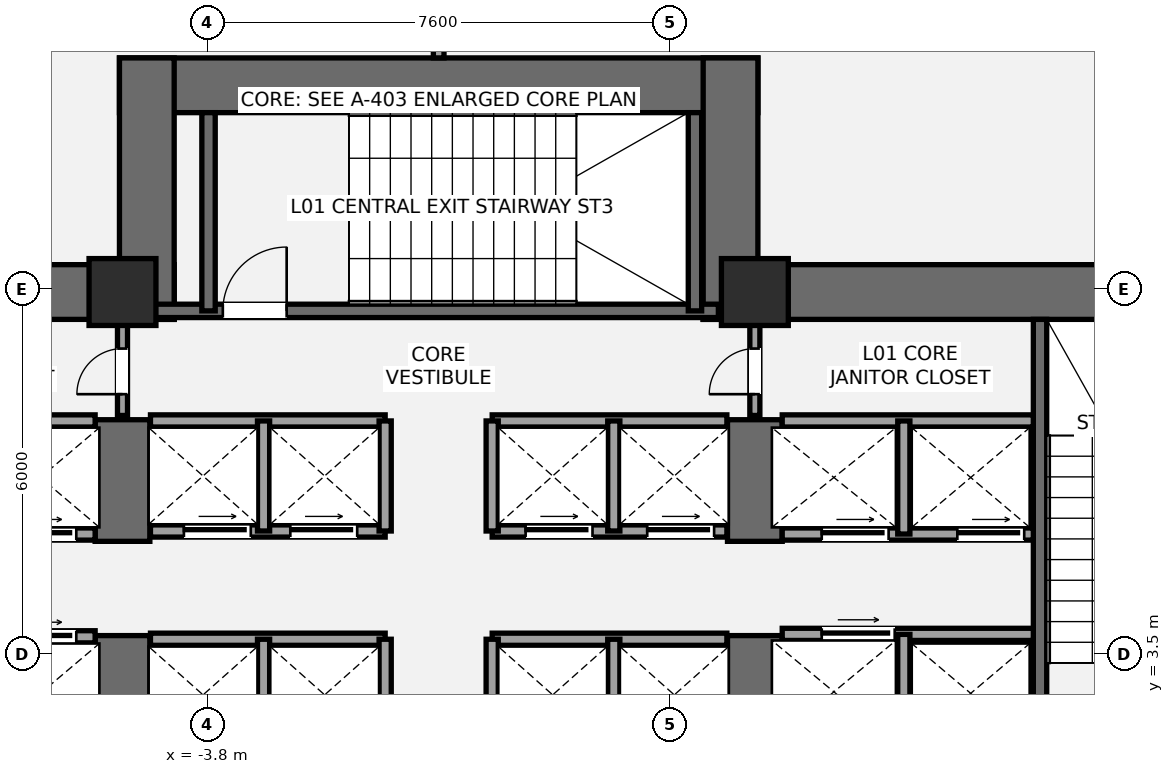
"""IFC4 building model, lengths in metres.
Left out: names, types, materials, properties, quantities, classifications, styles, units other than length and angle.
Written with IfcOpenShell. Run it as: python <this file> out.ifc"""

import sys

from ifc_helpers import new_model, si_unit, direction, frame, frame_2d, origin, origin_2d, place, context, subcontext, project, spatial, rectangle, extrude, element, fill, save


model = new_model("IFC4")
c1 = context("Model", 3, precision=1e-05, world=origin(), true_north=direction((0.0, 1.0)))
c2 = subcontext(c1, "Body", "Model", "MODEL_VIEW")
j1 = project(units=[si_unit("LENGTHUNIT", "METRE"), si_unit("PLANEANGLEUNIT", "RADIAN")], contexts=[c1])
p1 = place(None, origin())
s1 = spatial("IfcSite", under=j1, at=p1, CompositionType="ELEMENT")
p2 = place(p1, origin())
s2 = spatial("IfcBuilding", under=s1, at=p2, CompositionType="ELEMENT")
p3 = place(p2, frame((0.0, 0.0, 6.0)))
s3 = spatial("IfcBuildingStorey", under=s2, at=p3, CompositionType="ELEMENT", Elevation=6.0)
p4 = place(p3, frame((-14.05, 9.45, 0.0), z_axis=(0.0, 0.0, 1.0), x_axis=(1.0, 0.0, 0.0)))
e1 = element("IfcWall", 1, at=p4, inside=s3, PredefinedType="SHEAR", context=c2, shape_type="SweptSolid", body=[
    extrude(rectangle(XDim=9.7, YDim=0.9, at=frame_2d((4.85, 0.0))), origin(), (0.0, 0.0, 1.0), 4.2),
])
p5 = place(p3, frame((-5.2, 0.95, 0.0), z_axis=(0.0, 0.0, 1.0), x_axis=(0.0, 1.0, 0.0)))
e2 = element("IfcWall", 2, at=p5, inside=s3, PredefinedType="SHEAR", context=c2, shape_type="SweptSolid", body=[
    extrude(rectangle(XDim=2.85, YDim=0.9, at=frame_2d((1.425, 0.0))), origin(), (0.0, 0.0, 1.0), 4.2),
])
p6 = place(p3, frame((-5.2, 5.35, 0.0), z_axis=(0.0, 0.0, 1.0), x_axis=(0.0, 1.0, 0.0)))
e3 = element("IfcWall", 3, at=p6, inside=s3, PredefinedType="SHEAR", context=c2, shape_type="SweptSolid", body=[
    extrude(rectangle(XDim=2.0, YDim=0.9, at=frame_2d((1.0, 0.0))), origin(), (0.0, 0.0, 1.0), 4.2),
])
p7 = place(p3, frame((4.35, 9.45, 0.0), z_axis=(0.0, 0.0, 1.0), x_axis=(1.0, 0.0, 0.0)))
e4 = element("IfcWall", 4, at=p7, inside=s3, PredefinedType="SHEAR", context=c2, shape_type="SweptSolid", body=[
    extrude(rectangle(XDim=9.7, YDim=0.9, at=frame_2d((4.85, 0.0))), origin(), (0.0, 0.0, 1.0), 4.2),
])
p8 = place(p3, frame((5.2, 0.95, 0.0), z_axis=(0.0, 0.0, 1.0), x_axis=(0.0, 1.0, 0.0)))
e5 = element("IfcWall", 5, at=p8, inside=s3, PredefinedType="SHEAR", context=c2, shape_type="SweptSolid", body=[
    extrude(rectangle(XDim=2.85, YDim=0.9, at=frame_2d((1.425, 0.0))), origin(), (0.0, 0.0, 1.0), 4.2),
])
p9 = place(p3, frame((5.2, 5.35, 0.0), z_axis=(0.0, 0.0, 1.0), x_axis=(0.0, 1.0, 0.0)))
e6 = element("IfcWall", 6, at=p9, inside=s3, PredefinedType="SHEAR", context=c2, shape_type="SweptSolid", body=[
    extrude(rectangle(XDim=2.0, YDim=0.9, at=frame_2d((1.0, 0.0))), origin(), (0.0, 0.0, 1.0), 4.2),
])
p10 = place(p3, frame((9.89, 1.85, 0.0), z_axis=(0.0, 0.0, 1.0), x_axis=(0.0, 1.0, 0.0)))
e7 = element("IfcWall", 7, at=p10, inside=s3, PredefinedType="SHEAR", context=c2, shape_type="SweptSolid", body=[
    extrude(rectangle(XDim=7.15, YDim=0.22, at=frame_2d((3.575, 0.0))), origin(), (0.0, 0.0, 1.0), 4.2),
])
p11 = place(p3, frame((-5.25, 12.85, 0.0), z_axis=(0.0, 0.0, 1.0), x_axis=(1.0, 0.0, 0.0)))
e8 = element("IfcWall", 8, at=p11, inside=s3, PredefinedType="SHEAR", context=c2, shape_type="SweptSolid", body=[
    extrude(rectangle(XDim=10.5, YDim=0.9, at=frame_2d((5.25, 0.0))), origin(), (0.0, 0.0, 1.0), 4.2),
])
for number, where, z_axis, x_axis in (
    (9, (-4.8, 9.0, 0.0), (0.0, 0.0, 1.0), (0.0, 1.0, 0.0)),
    (10, (4.8, 9.0, 0.0), (0.0, 0.0, 1.0), (0.0, 1.0, 0.0)),
):
    element("IfcWall", number, at=place(p3, frame(where, z_axis=z_axis, x_axis=x_axis)), inside=s3, PredefinedType="SHEAR", context=c2, shape_type="SweptSolid", body=[
        extrude(rectangle(XDim=4.3, YDim=0.9, at=frame_2d((2.15, 0.0))), origin(), (0.0, 0.0, 1.0), 4.2),
    ])
p12 = place(p3, frame((-4.7, 9.14, 0.0), z_axis=(0.0, 0.0, 1.0), x_axis=(1.0, 0.0, 0.0)))
e11 = element("IfcWall", 11, at=p12, inside=s3, PredefinedType="SHEAR", context=c2, shape_type="SweptSolid", body=[
    extrude(rectangle(XDim=9.3, YDim=0.22, at=frame_2d((4.65, 0.0))), origin(), (0.0, 0.0, 1.0), 4.2),
])
p13 = place(p12, frame((1.15, 0.0, 0.0)))
e12 = element("IfcOpeningElement", 12, at=p13, cuts=e11, PredefinedType="OPENING", context=c2, shape_type="SweptSolid", body=[
    extrude(rectangle(XDim=1.05, YDim=2.15, at=frame_2d((0.525, 1.075))), frame((0.0, 0.12, 0.0), z_axis=(0.0, -1.0, 0.0), x_axis=(1.0, 0.0, 0.0)), (0.0, 0.0, 1.0), 0.24),
])
for number, where, z_axis, x_axis in (
    (13, (-3.785, 9.14, 0.0), (0.0, 0.0, 1.0), (0.0, 1.0, 0.0)),
    (14, (4.215, 9.14, 0.0), (0.0, 0.0, 1.0), (0.0, 1.0, 0.0)),
):
    element("IfcWall", number, at=place(p3, frame(where, z_axis=z_axis, x_axis=x_axis)), inside=s3, PredefinedType="SHEAR", context=c2, shape_type="SweptSolid", body=[
        extrude(rectangle(XDim=3.26, YDim=0.22, at=frame_2d((1.63, 0.0))), origin(), (0.0, 0.0, 1.0), 4.2),
    ])
for number, where, z_axis, x_axis in (
    (15, (-5.2, 9.45, 0.0), (0.0, 0.0, 1.0), (1.0, 0.0, 0.0)),
    (16, (5.2, 9.45, 0.0), (0.0, 0.0, 1.0), (1.0, 0.0, 0.0)),
):
    element("IfcColumn", number, at=place(p3, frame(where, z_axis=z_axis, x_axis=x_axis)), inside=s3, PredefinedType="COLUMN", context=c2, shape_type="SweptSolid", body=[
        extrude(rectangle(XDim=1.1, YDim=1.1, at=origin_2d()), origin(), (0.0, 0.0, 1.0), 4.2),
    ])
p14 = place(p3, frame((-9.78, 3.78, 0.0), z_axis=(0.0, 0.0, 1.0), x_axis=(1.0, 0.0, 0.0)))
e17 = element("IfcWall", 17, at=p14, inside=s3, PredefinedType="SOLIDWALL", context=c2, shape_type="SweptSolid", body=[
    extrude(rectangle(XDim=4.13, YDim=0.2, at=frame_2d((2.065, 0.0))), origin(), (0.0, 0.0, 1.0), 3.98),
])
p15 = place(p14, frame((2.72, 0.0, 0.0)))
e18 = element("IfcOpeningElement", 18, at=p15, cuts=e17, PredefinedType="OPENING", context=c2, shape_type="SweptSolid", body=[
    extrude(rectangle(XDim=1.1, YDim=2.2, at=frame_2d((0.55, 1.1))), frame((0.0, 0.11, 0.0), z_axis=(0.0, -1.0, 0.0), x_axis=(1.0, 0.0, 0.0)), (0.0, 0.0, 1.0), 0.22),
])
p16 = place(p3, frame((-9.78, 5.47, 0.0), z_axis=(0.0, 0.0, 1.0), x_axis=(1.0, 0.0, 0.0)))
e19 = element("IfcWall", 19, at=p16, inside=s3, PredefinedType="SOLIDWALL", context=c2, shape_type="SweptSolid", body=[
    extrude(rectangle(XDim=4.13, YDim=0.2, at=frame_2d((2.065, 0.0))), origin(), (0.0, 0.0, 1.0), 3.98),
])
p17 = place(p16, frame((0.55, 0.0, 0.0)))
e20 = element("IfcOpeningElement", 20, at=p17, cuts=e19, PredefinedType="OPENING", context=c2, shape_type="SweptSolid", body=[
    extrude(rectangle(XDim=1.1, YDim=2.2, at=frame_2d((0.55, 1.1))), frame((0.0, 0.11, 0.0), z_axis=(0.0, -1.0, 0.0), x_axis=(1.0, 0.0, 0.0)), (0.0, 0.0, 1.0), 0.22),
])
p18 = place(p16, frame((2.72, 0.0, 0.0)))
e21 = element("IfcOpeningElement", 21, at=p18, cuts=e19, PredefinedType="OPENING", context=c2, shape_type="SweptSolid", body=[
    extrude(rectangle(XDim=1.1, YDim=2.2, at=frame_2d((0.55, 1.1))), frame((0.0, 0.11, 0.0), z_axis=(0.0, -1.0, 0.0), x_axis=(1.0, 0.0, 0.0)), (0.0, 0.0, 1.0), 0.22),
])
p19 = place(p3, frame((-9.78, 7.33, 0.0), z_axis=(0.0, 0.0, 1.0), x_axis=(1.0, 0.0, 0.0)))
e22 = element("IfcWall", 22, at=p19, inside=s3, PredefinedType="SOLIDWALL", context=c2, shape_type="SweptSolid", body=[
    extrude(rectangle(XDim=4.13, YDim=0.2, at=frame_2d((2.065, 0.0))), origin(), (0.0, 0.0, 1.0), 3.98),
])
p20 = place(p3, frame((5.65, 3.82, 0.0), z_axis=(0.0, 0.0, 1.0), x_axis=(1.0, 0.0, 0.0)))
e23 = element("IfcWall", 23, at=p20, inside=s3, PredefinedType="SOLIDWALL", context=c2, shape_type="SweptSolid", body=[
    extrude(rectangle(XDim=4.13, YDim=0.2, at=frame_2d((2.065, 0.0))), origin(), (0.0, 0.0, 1.0), 3.98),
])
p21 = place(p20, frame((0.65, 0.0, 0.0)))
e24 = element("IfcOpeningElement", 24, at=p21, cuts=e23, PredefinedType="OPENING", context=c2, shape_type="SweptSolid", body=[
    extrude(rectangle(XDim=1.2, YDim=2.2, at=frame_2d((0.6, 1.1))), frame((0.0, 0.11, 0.0), z_axis=(0.0, -1.0, 0.0), x_axis=(1.0, 0.0, 0.0)), (0.0, 0.0, 1.0), 0.22),
])
p22 = place(p3, frame((7.65, 1.85, 0.0), z_axis=(0.0, 0.0, 1.0), x_axis=(0.0, 1.0, 0.0)))
e25 = element("IfcWall", 25, at=p22, inside=s3, PredefinedType="SOLIDWALL", context=c2, shape_type="SweptSolid", body=[
    extrude(rectangle(XDim=1.97, YDim=0.2, at=frame_2d((0.985, 0.0))), origin(), (0.0, 0.0, 1.0), 3.98),
])
p23 = place(p3, frame((5.65, 5.47, 0.0), z_axis=(0.0, 0.0, 1.0), x_axis=(1.0, 0.0, 0.0)))
e26 = element("IfcWall", 26, at=p23, inside=s3, PredefinedType="SOLIDWALL", context=c2, shape_type="SweptSolid", body=[
    extrude(rectangle(XDim=4.13, YDim=0.2, at=frame_2d((2.065, 0.0))), origin(), (0.0, 0.0, 1.0), 3.98),
])
p24 = place(p23, frame((0.65, 0.0, 0.0)))
e27 = element("IfcOpeningElement", 27, at=p24, cuts=e26, PredefinedType="OPENING", context=c2, shape_type="SweptSolid", body=[
    extrude(rectangle(XDim=1.1, YDim=2.2, at=frame_2d((0.55, 1.1))), frame((0.0, 0.11, 0.0), z_axis=(0.0, -1.0, 0.0), x_axis=(1.0, 0.0, 0.0)), (0.0, 0.0, 1.0), 0.22),
])
p25 = place(p23, frame((2.88, 0.0, 0.0)))
e28 = element("IfcOpeningElement", 28, at=p25, cuts=e26, PredefinedType="OPENING", context=c2, shape_type="SweptSolid", body=[
    extrude(rectangle(XDim=1.1, YDim=2.2, at=frame_2d((0.55, 1.1))), frame((0.0, 0.11, 0.0), z_axis=(0.0, -1.0, 0.0), x_axis=(1.0, 0.0, 0.0)), (0.0, 0.0, 1.0), 0.22),
])
p26 = place(p3, frame((5.65, 7.33, 0.0), z_axis=(0.0, 0.0, 1.0), x_axis=(1.0, 0.0, 0.0)))
e29 = element("IfcWall", 29, at=p26, inside=s3, PredefinedType="SOLIDWALL", context=c2, shape_type="SweptSolid", body=[
    extrude(rectangle(XDim=4.13, YDim=0.2, at=frame_2d((2.065, 0.0))), origin(), (0.0, 0.0, 1.0), 3.98),
])
p27 = place(p3, frame((7.65, 5.47, 0.0), z_axis=(0.0, 0.0, 1.0), x_axis=(0.0, 1.0, 0.0)))
e30 = element("IfcWall", 30, at=p27, inside=s3, PredefinedType="SOLIDWALL", context=c2, shape_type="SweptSolid", body=[
    extrude(rectangle(XDim=1.86, YDim=0.2, at=frame_2d((0.93, 0.0))), origin(), (0.0, 0.0, 1.0), 3.98),
])
for number, where, z_axis, x_axis in (
    (31, (-4.74, 3.74, 0.0), (0.0, 0.0, 1.0), (1.0, 0.0, 0.0)),
    (32, (0.88, 3.74, 0.0), (0.0, 0.0, 1.0), (1.0, 0.0, 0.0)),
):
    element("IfcWall", number, at=place(p3, frame(where, z_axis=z_axis, x_axis=x_axis)), inside=s3, PredefinedType="SOLIDWALL", context=c2, shape_type="SweptSolid", body=[
        extrude(rectangle(XDim=3.86, YDim=0.2, at=frame_2d((1.93, 0.0))), origin(), (0.0, 0.0, 1.0), 3.98),
    ])
for number, where, z_axis, x_axis in (
    (33, (-2.88, 1.92, 0.0), (0.0, 0.0, 1.0), (0.0, 1.0, 0.0)),
    (34, (2.88, 1.92, 0.0), (0.0, 0.0, 1.0), (0.0, 1.0, 0.0)),
    (35, (-0.88, 1.92, 0.0), (0.0, 0.0, 1.0), (0.0, 1.0, 0.0)),
    (36, (0.88, 1.92, 0.0), (0.0, 0.0, 1.0), (0.0, 1.0, 0.0)),
):
    element("IfcWall", number, at=place(p3, frame(where, z_axis=z_axis, x_axis=x_axis)), inside=s3, PredefinedType="SOLIDWALL", context=c2, shape_type="SweptSolid", body=[
        extrude(rectangle(XDim=1.82, YDim=0.2, at=frame_2d((0.91, 0.0))), origin(), (0.0, 0.0, 1.0), 3.98),
    ])
p28 = place(p3, frame((-4.74, 5.52, 0.0), z_axis=(0.0, 0.0, 1.0), x_axis=(1.0, 0.0, 0.0)))
e37 = element("IfcWall", 37, at=p28, inside=s3, PredefinedType="SOLIDWALL", context=c2, shape_type="SweptSolid", body=[
    extrude(rectangle(XDim=3.86, YDim=0.2, at=frame_2d((1.93, 0.0))), origin(), (0.0, 0.0, 1.0), 3.98),
])
p29 = place(p28, frame((0.55, 0.0, 0.0)))
e38 = element("IfcOpeningElement", 38, at=p29, cuts=e37, PredefinedType="OPENING", context=c2, shape_type="SweptSolid", body=[
    extrude(rectangle(XDim=1.1, YDim=2.2, at=frame_2d((0.55, 1.1))), frame((0.0, 0.11, 0.0), z_axis=(0.0, -1.0, 0.0), x_axis=(1.0, 0.0, 0.0)), (0.0, 0.0, 1.0), 0.22),
])
p30 = place(p28, frame((2.3, 0.0, 0.0)))
e39 = element("IfcOpeningElement", 39, at=p30, cuts=e37, PredefinedType="OPENING", context=c2, shape_type="SweptSolid", body=[
    extrude(rectangle(XDim=1.1, YDim=2.2, at=frame_2d((0.55, 1.1))), frame((0.0, 0.11, 0.0), z_axis=(0.0, -1.0, 0.0), x_axis=(1.0, 0.0, 0.0)), (0.0, 0.0, 1.0), 0.22),
])
p31 = place(p3, frame((0.88, 5.52, 0.0), z_axis=(0.0, 0.0, 1.0), x_axis=(1.0, 0.0, 0.0)))
e40 = element("IfcWall", 40, at=p31, inside=s3, PredefinedType="SOLIDWALL", context=c2, shape_type="SweptSolid", body=[
    extrude(rectangle(XDim=3.86, YDim=0.2, at=frame_2d((1.93, 0.0))), origin(), (0.0, 0.0, 1.0), 3.98),
])
p32 = place(p31, frame((0.55, 0.0, 0.0)))
e41 = element("IfcOpeningElement", 41, at=p32, cuts=e40, PredefinedType="OPENING", context=c2, shape_type="SweptSolid", body=[
    extrude(rectangle(XDim=1.1, YDim=2.2, at=frame_2d((0.55, 1.1))), frame((0.0, 0.11, 0.0), z_axis=(0.0, -1.0, 0.0), x_axis=(1.0, 0.0, 0.0)), (0.0, 0.0, 1.0), 0.22),
])
p33 = place(p31, frame((2.55, 0.0, 0.0)))
e42 = element("IfcOpeningElement", 42, at=p33, cuts=e40, PredefinedType="OPENING", context=c2, shape_type="SweptSolid", body=[
    extrude(rectangle(XDim=1.1, YDim=2.2, at=frame_2d((0.55, 1.1))), frame((0.0, 0.11, 0.0), z_axis=(0.0, -1.0, 0.0), x_axis=(1.0, 0.0, 0.0)), (0.0, 0.0, 1.0), 0.22),
])
for number, where, z_axis, x_axis in (
    (43, (-4.74, 7.33, 0.0), (0.0, 0.0, 1.0), (1.0, 0.0, 0.0)),
    (44, (0.88, 7.33, 0.0), (0.0, 0.0, 1.0), (1.0, 0.0, 0.0)),
):
    element("IfcWall", number, at=place(p3, frame(where, z_axis=z_axis, x_axis=x_axis)), inside=s3, PredefinedType="SOLIDWALL", context=c2, shape_type="SweptSolid", body=[
        extrude(rectangle(XDim=3.86, YDim=0.2, at=frame_2d((1.93, 0.0))), origin(), (0.0, 0.0, 1.0), 3.98),
    ])
for number, where, z_axis, x_axis in (
    (45, (-2.88, 5.52, 0.0), (0.0, 0.0, 1.0), (0.0, 1.0, 0.0)),
    (46, (2.88, 5.52, 0.0), (0.0, 0.0, 1.0), (0.0, 1.0, 0.0)),
    (47, (-0.88, 5.52, 0.0), (0.0, 0.0, 1.0), (0.0, 1.0, 0.0)),
    (48, (0.88, 5.52, 0.0), (0.0, 0.0, 1.0), (0.0, 1.0, 0.0)),
):
    element("IfcWall", number, at=place(p3, frame(where, z_axis=z_axis, x_axis=x_axis)), inside=s3, PredefinedType="SOLIDWALL", context=c2, shape_type="SweptSolid", body=[
        extrude(rectangle(XDim=1.81, YDim=0.2, at=frame_2d((0.905, 0.0))), origin(), (0.0, 0.0, 1.0), 3.98),
    ])
p34 = place(p3, frame((-5.2, 7.42, 0.0), z_axis=(0.0, 0.0, 1.0), x_axis=(0.0, 1.0, 0.0)))
e49 = element("IfcWall", 49, at=p34, inside=s3, PredefinedType="PARTITIONING", context=c2, shape_type="SweptSolid", body=[
    extrude(rectangle(XDim=1.58, YDim=0.165, at=frame_2d((0.79, 0.0))), origin(), (0.0, 0.0, 1.0), 3.98),
])
p35 = place(p34, frame((0.35, 0.0, 0.0)))
e50 = element("IfcOpeningElement", 50, at=p35, cuts=e49, PredefinedType="OPENING", context=c2, shape_type="SweptSolid", body=[
    extrude(rectangle(XDim=0.75, YDim=2.1, at=frame_2d((0.375, 1.05))), frame((0.0, 0.093, 0.0), z_axis=(0.0, -1.0, 0.0), x_axis=(1.0, 0.0, 0.0)), (0.0, 0.0, 1.0), 0.185),
])
p36 = place(p3, frame((5.2, 7.42, 0.0), z_axis=(0.0, 0.0, 1.0), x_axis=(0.0, 1.0, 0.0)))
e51 = element("IfcWall", 51, at=p36, inside=s3, PredefinedType="PARTITIONING", context=c2, shape_type="SweptSolid", body=[
    extrude(rectangle(XDim=1.58, YDim=0.165, at=frame_2d((0.79, 0.0))), origin(), (0.0, 0.0, 1.0), 3.98),
])
p37 = place(p36, frame((0.35, 0.0, 0.0)))
e52 = element("IfcOpeningElement", 52, at=p37, cuts=e51, PredefinedType="OPENING", context=c2, shape_type="SweptSolid", body=[
    extrude(rectangle(XDim=0.75, YDim=2.1, at=frame_2d((0.375, 1.05))), frame((0.0, 0.093, 0.0), z_axis=(0.0, -1.0, 0.0), x_axis=(1.0, 0.0, 0.0)), (0.0, 0.0, 1.0), 0.185),
])
p38 = place(p3, frame((0.0, 13.3, 0.0), z_axis=(0.0, 0.0, 1.0), x_axis=(0.0, 1.0, 0.0)))
e53 = element("IfcWall", 53, at=p38, inside=s3, PredefinedType="PARTITIONING", context=c2, shape_type="SweptSolid", body=[
    extrude(rectangle(XDim=8.106, YDim=0.175, at=frame_2d((4.053, 0.0))), origin(), (0.0, 0.0, 1.0), 3.98),
])
p39 = place(p13, origin())
e54 = element("IfcDoor", 54, at=p39, inside=s3, OperationType="SINGLE_SWING_RIGHT", PredefinedType="DOOR", context=c2, shape_type="SweptSolid", body=[
    extrude(rectangle(XDim=1.05, YDim=2.15, at=frame_2d((0.525, 1.075))), frame((0.0, 0.025, 0.0), z_axis=(0.0, -1.0, 0.0), x_axis=(1.0, 0.0, 0.0)), (0.0, 0.0, 1.0), 0.05),
])
fill(e12, e54)
p40 = place(p18, origin())
e55 = element("IfcDoor", 55, at=p40, inside=s3, OperationType="SLIDING_TO_LEFT", PredefinedType="DOOR", context=c2, shape_type="SweptSolid", body=[
    extrude(rectangle(XDim=1.1, YDim=2.2, at=frame_2d((0.55, 1.1))), frame((0.0, 0.025, 0.0), z_axis=(0.0, -1.0, 0.0), x_axis=(1.0, 0.0, 0.0)), (0.0, 0.0, 1.0), 0.05),
])
fill(e21, e55)
p41 = place(p15, origin())
e56 = element("IfcDoor", 56, at=p41, inside=s3, OperationType="SLIDING_TO_LEFT", PredefinedType="DOOR", context=c2, shape_type="SweptSolid", body=[
    extrude(rectangle(XDim=1.1, YDim=2.2, at=frame_2d((0.55, 1.1))), frame((0.0, 0.025, 0.0), z_axis=(0.0, -1.0, 0.0), x_axis=(1.0, 0.0, 0.0)), (0.0, 0.0, 1.0), 0.05),
])
fill(e18, e56)
p42 = place(p21, origin())
e57 = element("IfcDoor", 57, at=p42, inside=s3, OperationType="SLIDING_TO_RIGHT", PredefinedType="DOOR", context=c2, shape_type="SweptSolid", body=[
    extrude(rectangle(XDim=1.2, YDim=2.2, at=frame_2d((0.6, 1.1))), frame((0.0, 0.025, 0.0), z_axis=(0.0, -1.0, 0.0), x_axis=(1.0, 0.0, 0.0)), (0.0, 0.0, 1.0), 0.05),
])
fill(e24, e57)
p43 = place(p24, origin())
e58 = element("IfcDoor", 58, at=p43, inside=s3, OperationType="SLIDING_TO_LEFT", PredefinedType="DOOR", context=c2, shape_type="SweptSolid", body=[
    extrude(rectangle(XDim=1.1, YDim=2.2, at=frame_2d((0.55, 1.1))), frame((0.0, 0.025, 0.0), z_axis=(0.0, -1.0, 0.0), x_axis=(1.0, 0.0, 0.0)), (0.0, 0.0, 1.0), 0.05),
])
fill(e27, e58)
p44 = place(p25, origin())
e59 = element("IfcDoor", 59, at=p44, inside=s3, OperationType="SLIDING_TO_LEFT", PredefinedType="DOOR", context=c2, shape_type="SweptSolid", body=[
    extrude(rectangle(XDim=1.1, YDim=2.2, at=frame_2d((0.55, 1.1))), frame((0.0, 0.025, 0.0), z_axis=(0.0, -1.0, 0.0), x_axis=(1.0, 0.0, 0.0)), (0.0, 0.0, 1.0), 0.05),
])
fill(e28, e59)
p45 = place(p29, origin())
e60 = element("IfcDoor", 60, at=p45, inside=s3, OperationType="SLIDING_TO_LEFT", PredefinedType="DOOR", context=c2, shape_type="SweptSolid", body=[
    extrude(rectangle(XDim=1.1, YDim=2.2, at=frame_2d((0.55, 1.1))), frame((0.0, 0.025, 0.0), z_axis=(0.0, -1.0, 0.0), x_axis=(1.0, 0.0, 0.0)), (0.0, 0.0, 1.0), 0.05),
])
fill(e38, e60)
p46 = place(p30, origin())
e61 = element("IfcDoor", 61, at=p46, inside=s3, OperationType="SLIDING_TO_LEFT", PredefinedType="DOOR", context=c2, shape_type="SweptSolid", body=[
    extrude(rectangle(XDim=1.1, YDim=2.2, at=frame_2d((0.55, 1.1))), frame((0.0, 0.025, 0.0), z_axis=(0.0, -1.0, 0.0), x_axis=(1.0, 0.0, 0.0)), (0.0, 0.0, 1.0), 0.05),
])
fill(e39, e61)
p47 = place(p32, origin())
e62 = element("IfcDoor", 62, at=p47, inside=s3, OperationType="SLIDING_TO_LEFT", PredefinedType="DOOR", context=c2, shape_type="SweptSolid", body=[
    extrude(rectangle(XDim=1.1, YDim=2.2, at=frame_2d((0.55, 1.1))), frame((0.0, 0.025, 0.0), z_axis=(0.0, -1.0, 0.0), x_axis=(1.0, 0.0, 0.0)), (0.0, 0.0, 1.0), 0.05),
])
fill(e41, e62)
p48 = place(p33, origin())
e63 = element("IfcDoor", 63, at=p48, inside=s3, OperationType="SLIDING_TO_LEFT", PredefinedType="DOOR", context=c2, shape_type="SweptSolid", body=[
    extrude(rectangle(XDim=1.1, YDim=2.2, at=frame_2d((0.55, 1.1))), frame((0.0, 0.025, 0.0), z_axis=(0.0, -1.0, 0.0), x_axis=(1.0, 0.0, 0.0)), (0.0, 0.0, 1.0), 0.05),
])
fill(e42, e63)
p49 = place(p35, origin())
e64 = element("IfcDoor", 64, at=p49, inside=s3, OperationType="SINGLE_SWING_LEFT", PredefinedType="DOOR", context=c2, shape_type="SweptSolid", body=[
    extrude(rectangle(XDim=0.75, YDim=2.1, at=frame_2d((0.375, 1.05))), frame((0.0, 0.025, 0.0), z_axis=(0.0, -1.0, 0.0), x_axis=(1.0, 0.0, 0.0)), (0.0, 0.0, 1.0), 0.05),
])
fill(e50, e64)
p50 = place(p37, origin())
e65 = element("IfcDoor", 65, at=p50, inside=s3, OperationType="SINGLE_SWING_LEFT", PredefinedType="DOOR", context=c2, shape_type="SweptSolid", body=[
    extrude(rectangle(XDim=0.75, YDim=2.1, at=frame_2d((0.375, 1.05))), frame((0.0, 0.025, 0.0), z_axis=(0.0, -1.0, 0.0), x_axis=(1.0, 0.0, 0.0)), (0.0, 0.0, 1.0), 0.05),
])
fill(e52, e65)
save(model, sys.argv[1])
